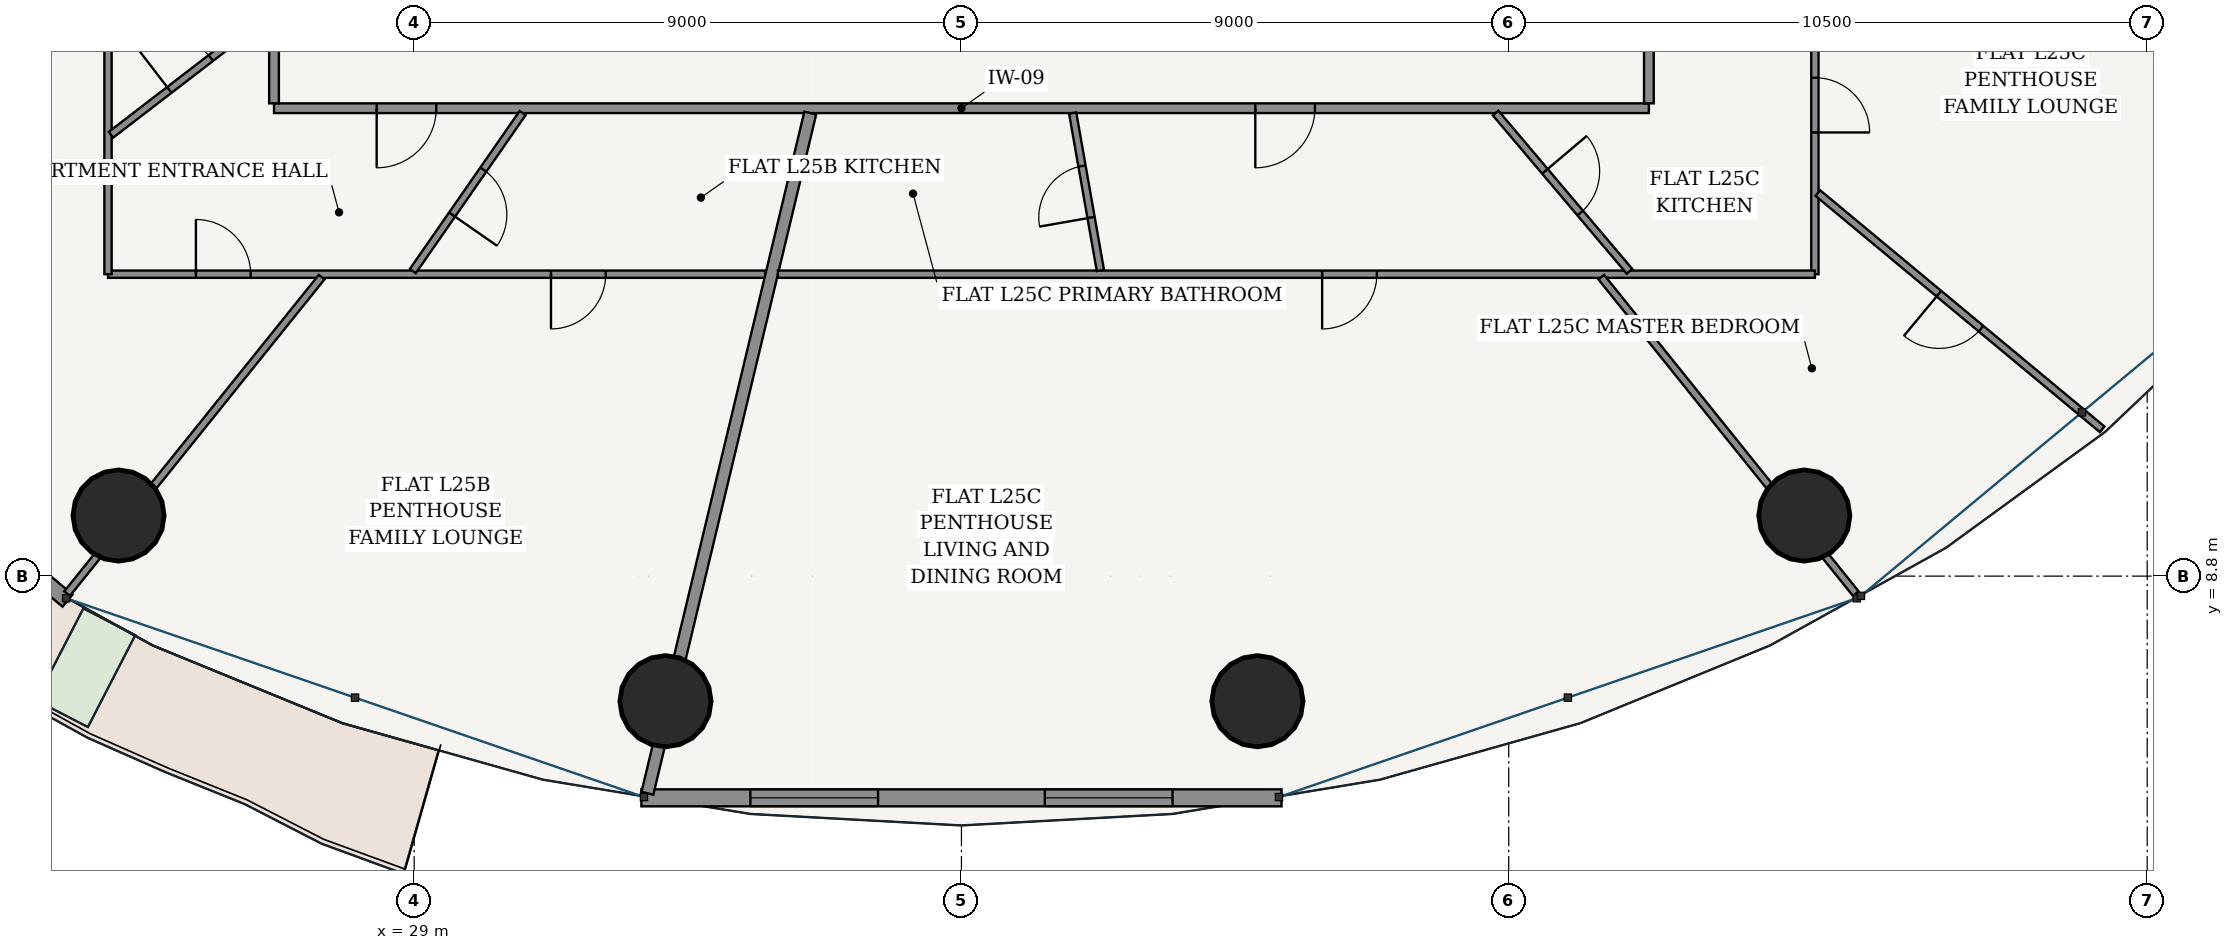
"""IFC4 building model, lengths in metres.
Left out: names, types, materials, properties, quantities, classifications, styles, units other than length and angle.
Written with IfcOpenShell. Run it as: python <this file> out.ifc"""

import sys

from ifc_helpers import new_model, si_unit, direction, frame, frame_2d, origin, origin_2d, place, context, subcontext, project, spatial, rectangle, hollow_circle, extrude, source, transform, mapped, element, fill, save


model = new_model("IFC4")
c1 = context("Model", 3, precision=1e-05, world=origin(), true_north=direction((-0.2419218956, 0.970295726276)))
c2 = subcontext(c1, "Body", "Model", "MODEL_VIEW")
j1 = project(units=[si_unit("LENGTHUNIT", "METRE"), si_unit("PLANEANGLEUNIT", "RADIAN")], contexts=[c1])
p1 = place(None, origin())
s1 = spatial("IfcSite", under=j1, at=p1, CompositionType="ELEMENT")
p2 = place(p1, origin())
s2 = spatial("IfcBuilding", under=s1, at=p2, CompositionType="ELEMENT")
p3 = place(p2, frame((0.0, 0.0, 97.8)))
s3 = spatial("IfcBuildingStorey", under=s2, at=p3, CompositionType="ELEMENT", Elevation=97.8)
for number, where, z_axis, x_axis in (
    (1, (24.138, 9.796, 0.0), (0.0, 0.0, 1.0), (1.0, 0.0, 0.0)),
    (2, (33.133, 6.743, 0.0), (0.0, 0.0, 1.0), (1.0, 0.0, 0.0)),
    (3, (42.867, 6.743, 0.0), (0.0, 0.0, 1.0), (1.0, 0.0, 0.0)),
    (4, (51.862, 9.796, 0.0), (0.0, 0.0, 1.0), (1.0, 0.0, 0.0)),
):
    element("IfcColumn", number, at=place(p3, frame(where, z_axis=z_axis, x_axis=x_axis)), inside=s3, PredefinedType="COLUMN", context=c2, shape_type="SweptSolid", body=[
        extrude(hollow_circle(Radius=0.75, WallThickness=0.045, at=origin_2d()), origin(), (0.0, 0.0, 1.0), 3.6),
    ])
p4 = place(p3, frame((15.846, 14.59, 0.0), z_axis=(0.0, 0.0, 1.0), x_axis=(0.769254958887, -0.638941944333, 0.0)))
e5 = element("IfcWall", 5, at=p4, inside=s3, PredefinedType="SOLIDWALL", context=c2, shape_type="SweptSolid", body=[
    extrude(rectangle(XDim=9.69, YDim=0.26, at=frame_2d((4.845, 0.0))), origin(), (0.0, 0.0, 1.0), 3.325),
])
p5 = place(p4, frame((4.17, 0.0, 0.0)))
e6 = element("IfcOpeningElement", 6, at=p5, cuts=e5, PredefinedType="OPENING", context=c2, shape_type="SweptSolid", body=[
    extrude(rectangle(XDim=1.35, YDim=2.2, at=frame_2d((0.675, 1.1))), frame((0.0, 0.14, 0.0), z_axis=(0.0, -1.0, 0.0), x_axis=(1.0, 0.0, 0.0)), (0.0, 0.0, 1.0), 0.28),
])
p6 = place(p3, frame((32.736, 5.154, 0.0), z_axis=(0.0, 0.0, 1.0), x_axis=(1.0, 0.0, 0.0)))
e7 = element("IfcWall", 7, at=p6, inside=s3, PredefinedType="SOLIDWALL", context=c2, shape_type="SweptSolid", body=[
    extrude(rectangle(XDim=10.527, YDim=0.28, at=frame_2d((5.264, 0.0))), origin(), (0.0, 0.0, 1.0), 3.325),
])
p7 = place(p6, frame((1.792, 0.0, 0.85)))
e8 = element("IfcOpeningElement", 8, at=p7, cuts=e7, PredefinedType="OPENING", context=c2, shape_type="SweptSolid", body=[
    extrude(rectangle(XDim=2.1, YDim=1.95, at=frame_2d((1.05, 0.975))), frame((0.0, 0.15, 0.0), z_axis=(0.0, -1.0, 0.0), x_axis=(1.0, 0.0, 0.0)), (0.0, 0.0, 1.0), 0.3),
])
p8 = place(p6, frame((6.635, 0.0, 0.85)))
e9 = element("IfcOpeningElement", 9, at=p8, cuts=e7, PredefinedType="OPENING", context=c2, shape_type="SweptSolid", body=[
    extrude(rectangle(XDim=2.1, YDim=1.95, at=frame_2d((1.05, 0.975))), frame((0.0, 0.15, 0.0), z_axis=(0.0, -1.0, 0.0), x_axis=(1.0, 0.0, 0.0)), (0.0, 0.0, 1.0), 0.3),
])
p9 = place(p3, frame((26.695, 16.495, 0.0), z_axis=(0.0, 0.0, 1.0), x_axis=(1.0, 0.0, 0.0)))
e10 = element("IfcWall", 10, at=p9, inside=s3, PredefinedType="PARTITIONING", context=c2, shape_type="SweptSolid", body=[
    extrude(rectangle(XDim=22.61, YDim=0.16, at=frame_2d((11.305, 0.0))), origin(), (0.0, 0.0, 1.0), 2.767),
])
p10 = place(p9, frame((1.688, 0.0, 0.0)))
e11 = element("IfcOpeningElement", 11, at=p10, cuts=e10, PredefinedType="OPENING", context=c2, shape_type="SweptSolid", body=[
    extrude(rectangle(XDim=0.98, YDim=2.2, at=frame_2d((0.49, 1.1))), frame((0.0, 0.09, 0.0), z_axis=(0.0, -1.0, 0.0), x_axis=(1.0, 0.0, 0.0)), (0.0, 0.0, 1.0), 0.18),
])
p11 = place(p9, frame((16.137, 0.0, 0.0)))
e12 = element("IfcOpeningElement", 12, at=p11, cuts=e10, PredefinedType="OPENING", context=c2, shape_type="SweptSolid", body=[
    extrude(rectangle(XDim=0.98, YDim=2.2, at=frame_2d((0.49, 1.1))), frame((0.0, 0.09, 0.0), z_axis=(0.0, -1.0, 0.0), x_axis=(1.0, 0.0, 0.0)), (0.0, 0.0, 1.0), 0.18),
])
for number, where, z_axis, x_axis in (
    (13, (26.695, 16.575, 0.0), (0.0, 0.0, 1.0), (0.0, 1.0, 0.0)),
    (14, (49.305, 16.575, 0.0), (0.0, 0.0, 1.0), (0.0, 1.0, 0.0)),
):
    element("IfcWall", number, at=place(p3, frame(where, z_axis=z_axis, x_axis=x_axis)), inside=s3, PredefinedType="PARTITIONING", context=c2, shape_type="SweptSolid", body=[
        extrude(rectangle(XDim=20.45, YDim=0.16, at=frame_2d((10.225, 0.0))), origin(), (0.0, 0.0, 1.0), 2.767),
    ])
p12 = place(p3, frame((34.777, 13.765, 0.0), z_axis=(0.0, 0.0, 1.0), x_axis=(-1.0, 0.0, 0.0)))
e15 = element("IfcWall", 15, at=p12, inside=s3, PredefinedType="PARTITIONING", context=c2, shape_type="SweptSolid", body=[
    extrude(rectangle(XDim=10.812, YDim=0.12, at=frame_2d((5.406, 0.0))), origin(), (0.0, 0.0, 1.0), 2.767),
])
p13 = place(p12, frame((8.466, 0.0, 0.0)))
e16 = element("IfcOpeningElement", 16, at=p13, cuts=e15, PredefinedType="OPENING", context=c2, shape_type="SweptSolid", body=[
    extrude(rectangle(XDim=0.9, YDim=2.15, at=frame_2d((0.45, 1.075))), frame((0.0, 0.07, 0.0), z_axis=(0.0, -1.0, 0.0), x_axis=(1.0, 0.0, 0.0)), (0.0, 0.0, 1.0), 0.14),
])
p14 = place(p12, frame((2.628, 0.0, 0.0)))
e17 = element("IfcOpeningElement", 17, at=p14, cuts=e15, PredefinedType="OPENING", context=c2, shape_type="SweptSolid", body=[
    extrude(rectangle(XDim=0.9, YDim=2.15, at=frame_2d((0.45, 1.075))), frame((0.0, 0.07, 0.0), z_axis=(0.0, -1.0, 0.0), x_axis=(1.0, 0.0, 0.0)), (0.0, 0.0, 1.0), 0.14),
])
p15 = place(p3, frame((23.965, 13.765, 0.0), z_axis=(0.0, 0.0, 1.0), x_axis=(0.0, 1.0, 0.0)))
e18 = element("IfcWall", 18, at=p15, inside=s3, PredefinedType="PARTITIONING", context=c2, shape_type="SweptSolid", body=[
    extrude(rectangle(XDim=20.725, YDim=0.12, at=frame_2d((10.362, 0.0))), origin(), (0.0, 0.0, 1.0), 2.767),
])
p16 = place(p15, frame((9.401, 0.0, 0.0)))
e19 = element("IfcOpeningElement", 19, at=p16, cuts=e18, PredefinedType="OPENING", context=c2, shape_type="SweptSolid", body=[
    extrude(rectangle(XDim=0.9, YDim=2.15, at=frame_2d((0.45, 1.075))), frame((0.0, 0.07, 0.0), z_axis=(0.0, -1.0, 0.0), x_axis=(1.0, 0.0, 0.0)), (0.0, 0.0, 1.0), 0.14),
])
p17 = place(p15, frame((18.157, 0.0, 0.0)))
e20 = element("IfcOpeningElement", 20, at=p17, cuts=e18, PredefinedType="OPENING", context=c2, shape_type="SweptSolid", body=[
    extrude(rectangle(XDim=0.86, YDim=2.15, at=frame_2d((0.43, 1.075))), frame((0.0, 0.07, 0.0), z_axis=(0.0, -1.0, 0.0), x_axis=(1.0, 0.0, 0.0)), (0.0, 0.0, 1.0), 0.14),
])
p18 = place(p15, frame((14.376, 0.0, 0.0)))
e21 = element("IfcOpeningElement", 21, at=p18, cuts=e18, PredefinedType="OPENING", context=c2, shape_type="SweptSolid", body=[
    extrude(rectangle(XDim=0.9, YDim=2.15, at=frame_2d((0.45, 1.075))), frame((0.0, 0.07, 0.0), z_axis=(0.0, -1.0, 0.0), x_axis=(1.0, 0.0, 0.0)), (0.0, 0.0, 1.0), 0.14),
])
p19 = place(p3, frame((23.911, 18.979, 0.0), z_axis=(0.0, 0.0, 1.0), x_axis=(-0.874313476423, -0.485361664066, 0.0)))
e22 = element("IfcWall", 22, at=p19, inside=s3, PredefinedType="PARTITIONING", context=c2, shape_type="SweptSolid", body=[
    extrude(rectangle(XDim=9.066, YDim=0.12, at=frame_2d((4.533, 0.0))), origin(), (0.0, 0.0, 1.0), 2.767),
])
p20 = place(p19, frame((3.016, 0.0, 0.0)))
e23 = element("IfcOpeningElement", 23, at=p20, cuts=e22, PredefinedType="OPENING", context=c2, shape_type="SweptSolid", body=[
    extrude(rectangle(XDim=0.9, YDim=2.15, at=frame_2d((0.45, 1.075))), frame((0.0, 0.07, 0.0), z_axis=(0.0, -1.0, 0.0), x_axis=(1.0, 0.0, 0.0)), (0.0, 0.0, 1.0), 0.14),
])
p21 = place(p3, frame((27.478, 13.717, 0.0), z_axis=(0.0, 0.0, 1.0), x_axis=(-0.626707979732, -0.77925419995, 0.0)))
e24 = element("IfcWall", 24, at=p21, inside=s3, PredefinedType="PARTITIONING", context=c2, shape_type="SweptSolid", body=[
    extrude(rectangle(XDim=6.679, YDim=0.12, at=frame_2d((3.339, 0.0))), origin(), (0.0, 0.0, 1.0), 2.767),
])
p22 = place(p3, frame((26.615, 18.056, 0.0), z_axis=(0.0, 0.0, 1.0), x_axis=(-0.79311360735, -0.609073727751, 0.0)))
e25 = element("IfcWall", 25, at=p22, inside=s3, PredefinedType="PARTITIONING", context=c2, shape_type="SweptSolid", body=[
    extrude(rectangle(XDim=3.279, YDim=0.12, at=frame_2d((1.64, 0.0))), origin(), (0.0, 0.0, 1.0), 3.004),
])
p23 = place(p22, frame((1.21, 0.0, 0.0)))
e26 = element("IfcOpeningElement", 26, at=p23, cuts=e25, PredefinedType="OPENING", context=c2, shape_type="SweptSolid", body=[
    extrude(rectangle(XDim=0.86, YDim=2.15, at=frame_2d((0.43, 1.075))), frame((0.0, 0.07, 0.0), z_axis=(0.0, -1.0, 0.0), x_axis=(1.0, 0.0, 0.0)), (0.0, 0.0, 1.0), 0.14),
])
p24 = place(p3, frame((30.783, 16.415, 0.0), z_axis=(0.0, 0.0, 1.0), x_axis=(-0.570653089326, -0.821191239385, 0.0)))
e27 = element("IfcWall", 27, at=p24, inside=s3, PredefinedType="PARTITIONING", context=c2, shape_type="SweptSolid", body=[
    extrude(rectangle(XDim=3.165, YDim=0.12, at=frame_2d((1.583, 0.0))), origin(), (0.0, 0.0, 1.0), 3.004),
])
p25 = place(p24, frame((1.133, 0.0, 0.0)))
e28 = element("IfcOpeningElement", 28, at=p25, cuts=e27, PredefinedType="OPENING", context=c2, shape_type="SweptSolid", body=[
    extrude(rectangle(XDim=0.9, YDim=2.15, at=frame_2d((0.45, 1.075))), frame((0.0, 0.07, 0.0), z_axis=(0.0, -1.0, 0.0), x_axis=(1.0, 0.0, 0.0)), (0.0, 0.0, 1.0), 0.14),
])
p26 = place(p3, frame((35.514, 16.415, 0.0), z_axis=(0.0, 0.0, 1.0), x_axis=(-0.232829417917, -0.972517589636, 0.0)))
e29 = element("IfcWall", 29, at=p26, inside=s3, PredefinedType="PARTITIONING", context=c2, shape_type="SweptSolid", body=[
    extrude(rectangle(XDim=11.502, YDim=0.2, at=frame_2d((5.751, 0.0))), origin(), (0.0, 0.0, 1.0), 2.767),
])
p27 = place(p3, frame((52.035, 34.49, 0.0), z_axis=(0.0, 0.0, 1.0), x_axis=(0.0, -1.0, 0.0)))
e30 = element("IfcWall", 30, at=p27, inside=s3, PredefinedType="PARTITIONING", context=c2, shape_type="SweptSolid", body=[
    extrude(rectangle(XDim=20.725, YDim=0.12, at=frame_2d((10.362, 0.0))), origin(), (0.0, 0.0, 1.0), 2.767),
])
p28 = place(p27, frame((17.493, 0.0, 0.0)))
e31 = element("IfcOpeningElement", 31, at=p28, cuts=e30, PredefinedType="OPENING", context=c2, shape_type="SweptSolid", body=[
    extrude(rectangle(XDim=0.9, YDim=2.15, at=frame_2d((0.45, 1.075))), frame((0.0, 0.07, 0.0), z_axis=(0.0, -1.0, 0.0), x_axis=(1.0, 0.0, 0.0)), (0.0, 0.0, 1.0), 0.14),
])
p29 = place(p27, frame((14.064, 0.0, 0.0)))
e32 = element("IfcOpeningElement", 32, at=p29, cuts=e30, PredefinedType="OPENING", context=c2, shape_type="SweptSolid", body=[
    extrude(rectangle(XDim=0.9, YDim=2.15, at=frame_2d((0.45, 1.075))), frame((0.0, 0.07, 0.0), z_axis=(0.0, -1.0, 0.0), x_axis=(1.0, 0.0, 0.0)), (0.0, 0.0, 1.0), 0.14),
])
p30 = place(p3, frame((52.035, 13.765, 0.0), z_axis=(0.0, 0.0, 1.0), x_axis=(-1.0, 0.0, 0.0)))
e33 = element("IfcWall", 33, at=p30, inside=s3, PredefinedType="PARTITIONING", context=c2, shape_type="SweptSolid", body=[
    extrude(rectangle(XDim=17.054, YDim=0.12, at=frame_2d((8.527, 0.0))), origin(), (0.0, 0.0, 1.0), 2.767),
])
p31 = place(p30, frame((7.203, 0.0, 0.0)))
e34 = element("IfcOpeningElement", 34, at=p31, cuts=e33, PredefinedType="OPENING", context=c2, shape_type="SweptSolid", body=[
    extrude(rectangle(XDim=0.9, YDim=2.15, at=frame_2d((0.45, 1.075))), frame((0.0, 0.07, 0.0), z_axis=(0.0, -1.0, 0.0), x_axis=(1.0, 0.0, 0.0)), (0.0, 0.0, 1.0), 0.14),
])
p32 = place(p3, frame((48.522, 13.717, 0.0), z_axis=(0.0, 0.0, 1.0), x_axis=(0.626707979732, -0.77925419995, 0.0)))
e35 = element("IfcWall", 35, at=p32, inside=s3, PredefinedType="PARTITIONING", context=c2, shape_type="SweptSolid", body=[
    extrude(rectangle(XDim=6.679, YDim=0.12, at=frame_2d((3.339, 0.0))), origin(), (0.0, 0.0, 1.0), 2.767),
])
p33 = place(p3, frame((52.083, 15.1, 0.0), z_axis=(0.0, 0.0, 1.0), x_axis=(0.769161827891, -0.63905405289, 0.0)))
e36 = element("IfcWall", 36, at=p33, inside=s3, PredefinedType="PARTITIONING", context=c2, shape_type="SweptSolid", body=[
    extrude(rectangle(XDim=6.08, YDim=0.12, at=frame_2d((3.04, 0.0))), origin(), (0.0, 0.0, 1.0), 2.767),
])
p34 = place(p33, frame((2.59, 0.0, 0.0)))
e37 = element("IfcOpeningElement", 37, at=p34, cuts=e36, PredefinedType="OPENING", context=c2, shape_type="SweptSolid", body=[
    extrude(rectangle(XDim=0.9, YDim=2.15, at=frame_2d((0.45, 1.075))), frame((0.0, 0.07, 0.0), z_axis=(0.0, -1.0, 0.0), x_axis=(1.0, 0.0, 0.0)), (0.0, 0.0, 1.0), 0.14),
])
p35 = place(p3, frame((39.829, 16.415, 0.0), z_axis=(0.0, 0.0, 1.0), x_axis=(0.173488627881, -0.984835872618, 0.0)))
e38 = element("IfcWall", 38, at=p35, inside=s3, PredefinedType="PARTITIONING", context=c2, shape_type="SweptSolid", body=[
    extrude(rectangle(XDim=2.629, YDim=0.12, at=frame_2d((1.314, 0.0))), origin(), (0.0, 0.0, 1.0), 3.325),
])
p36 = place(p35, frame((0.885, 0.0, 0.0)))
e39 = element("IfcOpeningElement", 39, at=p36, cuts=e38, PredefinedType="OPENING", context=c2, shape_type="SweptSolid", body=[
    extrude(rectangle(XDim=0.86, YDim=2.15, at=frame_2d((0.43, 1.075))), frame((0.0, 0.07, 0.0), z_axis=(0.0, -1.0, 0.0), x_axis=(1.0, 0.0, 0.0)), (0.0, 0.0, 1.0), 0.14),
])
p37 = place(p3, frame((46.785, 16.415, 0.0), z_axis=(0.0, 0.0, 1.0), x_axis=(0.64582345164, -0.76348678398, 0.0)))
e40 = element("IfcWall", 40, at=p37, inside=s3, PredefinedType="PARTITIONING", context=c2, shape_type="SweptSolid", body=[
    extrude(rectangle(XDim=3.409, YDim=0.12, at=frame_2d((1.705, 0.0))), origin(), (0.0, 0.0, 1.0), 3.004),
])
p38 = place(p37, frame((1.254, 0.0, 0.0)))
e41 = element("IfcOpeningElement", 41, at=p38, cuts=e40, PredefinedType="OPENING", context=c2, shape_type="SweptSolid", body=[
    extrude(rectangle(XDim=0.9, YDim=2.15, at=frame_2d((0.45, 1.075))), frame((0.0, 0.07, 0.0), z_axis=(0.0, -1.0, 0.0), x_axis=(1.0, 0.0, 0.0)), (0.0, 0.0, 1.0), 0.14),
])
m1 = source(origin(), c2, "Body", "SweptSolid", [
    extrude(rectangle(XDim=2.1, YDim=1.95, at=frame_2d((1.05, 0.975))), frame((0.0, 0.03, 0.0), z_axis=(0.0, -1.0, 0.0), x_axis=(1.0, 0.0, 0.0)), (0.0, 0.0, 1.0), 0.06),
])
p39 = place(p7, origin())
e42 = element("IfcWindow", 42, at=p39, inside=s3, PartitioningType="SINGLE_PANEL", PredefinedType="WINDOW", context=c2, shape_type="MappedRepresentation", body=[
    mapped(m1, transform((0.0, 0.0, 0.0), scale=1.0)),
])
fill(e8, e42)
p40 = place(p8, origin())
e43 = element("IfcWindow", 43, at=p40, inside=s3, PartitioningType="SINGLE_PANEL", PredefinedType="WINDOW", context=c2, shape_type="MappedRepresentation", body=[
    mapped(m1, transform((0.0, 0.0, 0.0), scale=1.0)),
])
fill(e9, e43)
m2 = source(origin(), c2, "Body", "SweptSolid", [
    extrude(rectangle(XDim=0.98, YDim=2.2, at=frame_2d((0.49, 1.1))), frame((0.0, 0.025, 0.0), z_axis=(0.0, -1.0, 0.0), x_axis=(1.0, 0.0, 0.0)), (0.0, 0.0, 1.0), 0.05),
])
p41 = place(p10, frame((0.98, 0.0, 0.0), z_axis=(0.0, 0.0, 1.0), x_axis=(-1.0, 0.0, 0.0)))
e44 = element("IfcDoor", 44, at=p41, inside=s3, OperationType="SINGLE_SWING_RIGHT", PredefinedType="DOOR", context=c2, shape_type="MappedRepresentation", body=[
    mapped(m2, transform((0.0, 0.0, 0.0), scale=1.0)),
])
fill(e11, e44)
m3 = source(origin(), c2, "Body", "SweptSolid", [
    extrude(rectangle(XDim=0.86, YDim=2.15, at=frame_2d((0.43, 1.075))), frame((0.0, 0.025, 0.0), z_axis=(0.0, -1.0, 0.0), x_axis=(1.0, 0.0, 0.0)), (0.0, 0.0, 1.0), 0.05),
])
p42 = place(p23, frame((0.86, 0.0, 0.0), z_axis=(0.0, 0.0, 1.0), x_axis=(-1.0, 0.0, 0.0)))
e45 = element("IfcDoor", 45, at=p42, inside=s3, OperationType="SINGLE_SWING_LEFT", PredefinedType="DOOR", context=c2, shape_type="MappedRepresentation", body=[
    mapped(m3, transform((0.0, 0.0, 0.0), scale=1.0)),
])
fill(e26, e45)
m4 = source(origin(), c2, "Body", "SweptSolid", [
    extrude(rectangle(XDim=0.9, YDim=2.15, at=frame_2d((0.45, 1.075))), frame((0.0, 0.025, 0.0), z_axis=(0.0, -1.0, 0.0), x_axis=(1.0, 0.0, 0.0)), (0.0, 0.0, 1.0), 0.05),
])
p43 = place(p25, origin())
e46 = element("IfcDoor", 46, at=p43, inside=s3, OperationType="SINGLE_SWING_RIGHT", PredefinedType="DOOR", context=c2, shape_type="MappedRepresentation", body=[
    mapped(m4, transform((0.0, 0.0, 0.0), scale=1.0)),
])
fill(e28, e46)
p44 = place(p13, frame((0.9, 0.0, 0.0), z_axis=(0.0, 0.0, 1.0), x_axis=(-1.0, 0.0, 0.0)))
e47 = element("IfcDoor", 47, at=p44, inside=s3, OperationType="SINGLE_SWING_LEFT", PredefinedType="DOOR", context=c2, shape_type="MappedRepresentation", body=[
    mapped(m4, transform((0.0, 0.0, 0.0), scale=1.0)),
])
fill(e16, e47)
p45 = place(p14, origin())
e48 = element("IfcDoor", 48, at=p45, inside=s3, OperationType="SINGLE_SWING_RIGHT", PredefinedType="DOOR", context=c2, shape_type="MappedRepresentation", body=[
    mapped(m4, transform((0.0, 0.0, 0.0), scale=1.0)),
])
fill(e17, e48)
p46 = place(p11, frame((0.98, 0.0, 0.0), z_axis=(0.0, 0.0, 1.0), x_axis=(-1.0, 0.0, 0.0)))
e49 = element("IfcDoor", 49, at=p46, inside=s3, OperationType="SINGLE_SWING_RIGHT", PredefinedType="DOOR", context=c2, shape_type="MappedRepresentation", body=[
    mapped(m2, transform((0.0, 0.0, 0.0), scale=1.0)),
])
fill(e12, e49)
p47 = place(p36, frame((0.86, 0.0, 0.0), z_axis=(0.0, 0.0, 1.0), x_axis=(-1.0, 0.0, 0.0)))
e50 = element("IfcDoor", 50, at=p47, inside=s3, OperationType="SINGLE_SWING_LEFT", PredefinedType="DOOR", context=c2, shape_type="MappedRepresentation", body=[
    mapped(m3, transform((0.0, 0.0, 0.0), scale=1.0)),
])
fill(e39, e50)
p48 = place(p31, origin())
e51 = element("IfcDoor", 51, at=p48, inside=s3, OperationType="SINGLE_SWING_RIGHT", PredefinedType="DOOR", context=c2, shape_type="MappedRepresentation", body=[
    mapped(m4, transform((0.0, 0.0, 0.0), scale=1.0)),
])
fill(e34, e51)
p49 = place(p38, origin())
e52 = element("IfcDoor", 52, at=p49, inside=s3, OperationType="SINGLE_SWING_LEFT", PredefinedType="DOOR", context=c2, shape_type="MappedRepresentation", body=[
    mapped(m4, transform((0.0, 0.0, 0.0), scale=1.0)),
])
fill(e41, e52)
p50 = place(p28, origin())
e53 = element("IfcDoor", 53, at=p50, inside=s3, OperationType="SINGLE_SWING_RIGHT", PredefinedType="DOOR", context=c2, shape_type="MappedRepresentation", body=[
    mapped(m4, transform((0.0, 0.0, 0.0), scale=1.0)),
])
fill(e31, e53)
p51 = place(p34, frame((0.9, 0.0, 0.0), z_axis=(0.0, 0.0, 1.0), x_axis=(-1.0, 0.0, 0.0)))
e54 = element("IfcDoor", 54, at=p51, inside=s3, OperationType="SINGLE_SWING_RIGHT", PredefinedType="DOOR", context=c2, shape_type="MappedRepresentation", body=[
    mapped(m4, transform((0.0, 0.0, 0.0), scale=1.0)),
])
fill(e37, e54)
save(model, sys.argv[1])
